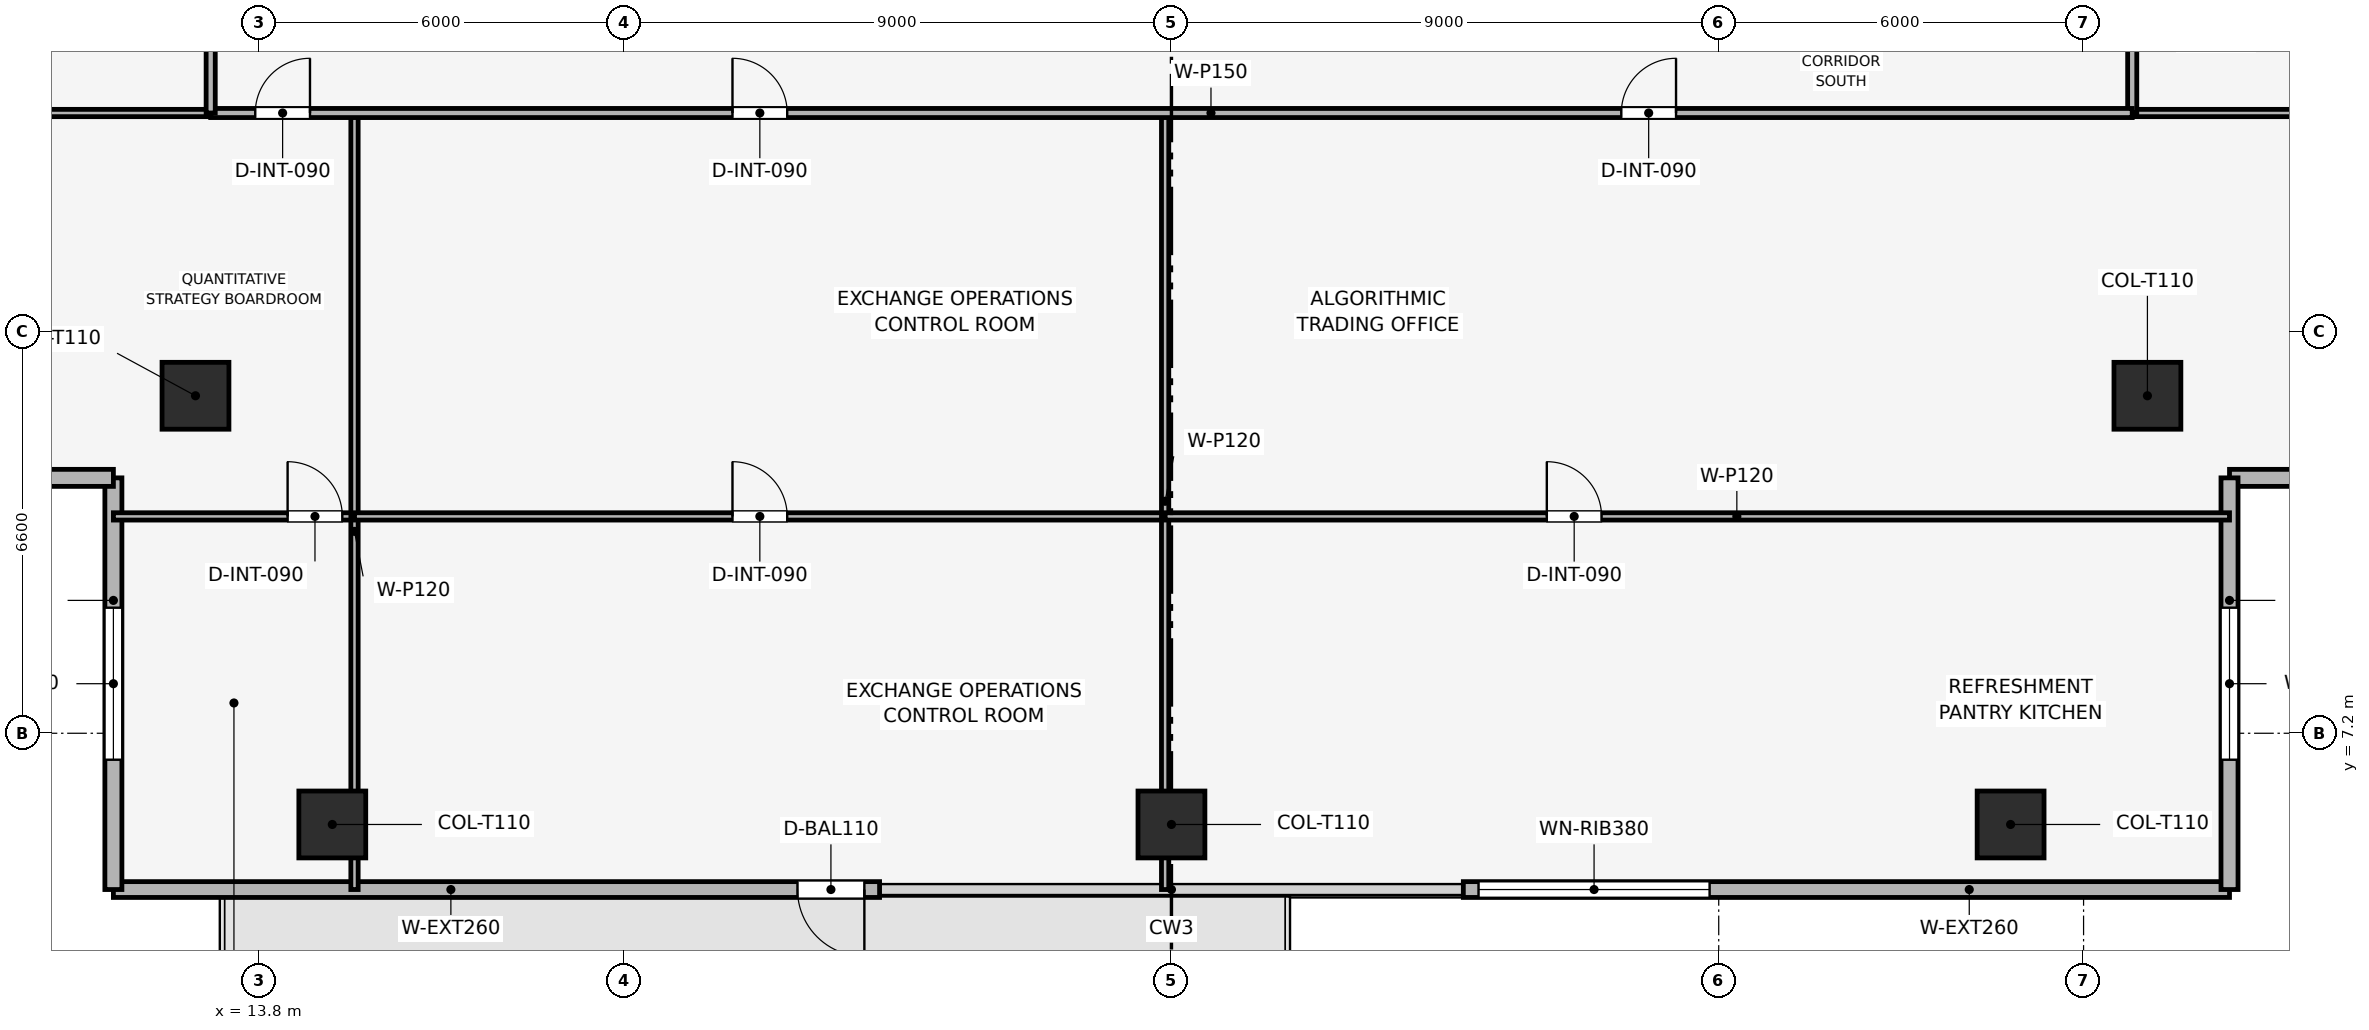
"""IFC4 building model, lengths in metres.
Left out: names, types, materials, properties, quantities, classifications, styles, units other than length and angle.
Written with IfcOpenShell. Run it as: python <this file> out.ifc"""

import sys

from ifc_helpers import new_model, si_unit, direction, frame, frame_2d, origin, origin_2d, place, context, subcontext, project, spatial, rectangle, extrude, element, fill, save


model = new_model("IFC4")
c1 = context("Model", 3, precision=1e-05, world=origin(), true_north=direction((0.0, 1.0)))
c2 = subcontext(c1, "Body", "Model", "MODEL_VIEW")
j1 = project(units=[si_unit("LENGTHUNIT", "METRE"), si_unit("PLANEANGLEUNIT", "RADIAN")], contexts=[c1])
p1 = place(None, origin())
s1 = spatial("IfcSite", under=j1, at=p1, CompositionType="ELEMENT")
p2 = place(p1, origin())
s2 = spatial("IfcBuilding", under=s1, at=p2, CompositionType="ELEMENT")
p3 = place(p2, frame((0.0, 0.0, 160.8)))
s3 = spatial("IfcBuildingStorey", under=s2, at=p3, CompositionType="ELEMENT", Elevation=160.8)
for number, where, z_axis, x_axis in (
    (1, (15.0, 5.7, 0.003), (0.0, 0.0, 1.0), (1.0, 0.0, 0.0)),
    (2, (28.8, 5.7, 0.003), (0.0, 0.0, 1.0), (1.0, 0.0, 0.0)),
    (3, (42.6, 5.7, 0.003), (0.0, 0.0, 1.0), (1.0, 0.0, 0.0)),
    (4, (12.75, 12.75, 0.003), (0.0, 0.0, 1.0), (1.0, 0.0, 0.0)),
    (5, (44.85, 12.75, 0.003), (0.0, 0.0, 1.0), (1.0, 0.0, 0.0)),
):
    element("IfcColumn", number, at=place(p3, frame(where, z_axis=z_axis, x_axis=x_axis)), inside=s3, PredefinedType="COLUMN", context=c2, shape_type="SweptSolid", body=[
        extrude(rectangle(XDim=1.1, YDim=1.1, at=origin_2d()), origin(), (0.0, 0.0, 1.0), 3.489),
    ])
p4 = place(p3, frame((46.2, 4.63, 0.0), z_axis=(0.0, 0.0, 1.0), x_axis=(-1.0, 0.0, 0.0)))
e6 = element("IfcWall", 6, at=p4, inside=s3, PredefinedType="SOLIDWALL", context=c2, shape_type="SweptSolid", body=[
    extrude(rectangle(XDim=12.6, YDim=0.26, at=frame_2d((6.3, 0.0))), origin(), (0.0, 0.0, 1.0), 3.495),
])
p5 = place(p4, frame((8.55, 0.0, 0.9)))
e7 = element("IfcOpeningElement", 7, at=p5, cuts=e6, PredefinedType="OPENING", context=c2, shape_type="SweptSolid", body=[
    extrude(rectangle(XDim=3.8, YDim=1.9, at=frame_2d((1.9, 0.95))), frame((0.0, 0.14, 0.0), z_axis=(0.0, -1.0, 0.0), x_axis=(1.0, 0.0, 0.0)), (0.0, 0.0, 1.0), 0.28),
])
p6 = place(p3, frame((24.0, 4.63, 0.0), z_axis=(0.0, 0.0, 1.0), x_axis=(-1.0, 0.0, 0.0)))
e8 = element("IfcWall", 8, at=p6, inside=s3, PredefinedType="SOLIDWALL", context=c2, shape_type="SweptSolid", body=[
    extrude(rectangle(XDim=12.6, YDim=0.26, at=frame_2d((6.3, 0.0))), origin(), (0.0, 0.0, 1.0), 3.495),
])
p7 = place(p6, frame((0.25, 0.0, 0.0)))
e9 = element("IfcOpeningElement", 9, at=p7, cuts=e8, PredefinedType="OPENING", context=c2, shape_type="SweptSolid", body=[
    extrude(rectangle(XDim=1.1, YDim=2.2, at=frame_2d((0.55, 1.1))), frame((0.0, 0.14, 0.0), z_axis=(0.0, -1.0, 0.0), x_axis=(1.0, 0.0, 0.0)), (0.0, 0.0, 1.0), 0.28),
])
p8 = place(p3, frame((11.4, 4.63, 0.0), z_axis=(0.0, 0.0, 1.0), x_axis=(0.0, 1.0, 0.0)))
e10 = element("IfcWall", 10, at=p8, inside=s3, PredefinedType="SOLIDWALL", context=c2, shape_type="SweptSolid", body=[
    extrude(rectangle(XDim=6.77, YDim=0.28, at=frame_2d((3.385, 0.0))), origin(), (0.0, 0.0, 1.0), 3.495),
])
p9 = place(p8, frame((2.135, 0.0, 0.9)))
e11 = element("IfcOpeningElement", 11, at=p9, cuts=e10, PredefinedType="OPENING", context=c2, shape_type="SweptSolid", body=[
    extrude(rectangle(XDim=2.5, YDim=1.9, at=frame_2d((1.25, 0.95))), frame((0.0, 0.15, 0.0), z_axis=(0.0, -1.0, 0.0), x_axis=(1.0, 0.0, 0.0)), (0.0, 0.0, 1.0), 0.3),
])
p10 = place(p3, frame((11.4, 11.4, 0.0), z_axis=(0.0, 0.0, 1.0), x_axis=(-1.0, 0.0, 0.0)))
e12 = element("IfcWall", 12, at=p10, inside=s3, PredefinedType="SOLIDWALL", context=c2, shape_type="SweptSolid", body=[
    extrude(rectangle(XDim=6.77, YDim=0.28, at=frame_2d((3.385, 0.0))), origin(), (0.0, 0.0, 1.0), 3.495),
])
p11 = place(p10, frame((2.135, 0.0, 0.9)))
e13 = element("IfcOpeningElement", 13, at=p11, cuts=e12, PredefinedType="OPENING", context=c2, shape_type="SweptSolid", body=[
    extrude(rectangle(XDim=2.5, YDim=1.9, at=frame_2d((1.25, 0.95))), frame((0.0, 0.15, 0.0), z_axis=(0.0, -1.0, 0.0), x_axis=(1.0, 0.0, 0.0)), (0.0, 0.0, 1.0), 0.3),
])
p12 = place(p3, frame((52.97, 11.4, 0.0), z_axis=(0.0, 0.0, 1.0), x_axis=(-1.0, 0.0, 0.0)))
e14 = element("IfcWall", 14, at=p12, inside=s3, PredefinedType="SOLIDWALL", context=c2, shape_type="SweptSolid", body=[
    extrude(rectangle(XDim=6.77, YDim=0.28, at=frame_2d((3.385, 0.0))), origin(), (0.0, 0.0, 1.0), 3.495),
])
p13 = place(p12, frame((2.135, 0.0, 0.9)))
e15 = element("IfcOpeningElement", 15, at=p13, cuts=e14, PredefinedType="OPENING", context=c2, shape_type="SweptSolid", body=[
    extrude(rectangle(XDim=2.5, YDim=1.9, at=frame_2d((1.25, 0.95))), frame((0.0, 0.15, 0.0), z_axis=(0.0, -1.0, 0.0), x_axis=(1.0, 0.0, 0.0)), (0.0, 0.0, 1.0), 0.3),
])
p14 = place(p3, frame((46.2, 11.4, 0.0), z_axis=(0.0, 0.0, 1.0), x_axis=(0.0, -1.0, 0.0)))
e16 = element("IfcWall", 16, at=p14, inside=s3, PredefinedType="SOLIDWALL", context=c2, shape_type="SweptSolid", body=[
    extrude(rectangle(XDim=6.77, YDim=0.28, at=frame_2d((3.385, 0.0))), origin(), (0.0, 0.0, 1.0), 3.495),
])
p15 = place(p14, frame((2.135, 0.0, 0.9)))
e17 = element("IfcOpeningElement", 17, at=p15, cuts=e16, PredefinedType="OPENING", context=c2, shape_type="SweptSolid", body=[
    extrude(rectangle(XDim=2.5, YDim=1.9, at=frame_2d((1.25, 0.95))), frame((0.0, 0.15, 0.0), z_axis=(0.0, -1.0, 0.0), x_axis=(1.0, 0.0, 0.0)), (0.0, 0.0, 1.0), 0.3),
])
p16 = place(p3, frame((11.4, 10.766, 0.0), z_axis=(0.0, 0.0, 1.0), x_axis=(1.0, 0.0, 0.0)))
e18 = element("IfcWall", 18, at=p16, inside=s3, PredefinedType="PARTITIONING", context=c2, shape_type="SweptSolid", body=[
    extrude(rectangle(XDim=3.965, YDim=0.12, at=frame_2d((1.982, 0.0))), origin(), (0.0, 0.0, 1.0), 2.98),
])
p17 = place(p16, frame((2.865, 0.0, 0.0)))
e19 = element("IfcOpeningElement", 19, at=p17, cuts=e18, PredefinedType="OPENING", context=c2, shape_type="SweptSolid", body=[
    extrude(rectangle(XDim=0.9, YDim=2.1, at=frame_2d((0.45, 1.05))), frame((0.0, 0.07, 0.0), z_axis=(0.0, -1.0, 0.0), x_axis=(1.0, 0.0, 0.0)), (0.0, 0.0, 1.0), 0.14),
])
p18 = place(p3, frame((15.365, 4.63, 0.0), z_axis=(0.0, 0.0, 1.0), x_axis=(0.0, 1.0, 0.0)))
e20 = element("IfcWall", 20, at=p18, inside=s3, PredefinedType="PARTITIONING", context=c2, shape_type="SweptSolid", body=[
    extrude(rectangle(XDim=12.77, YDim=0.12, at=frame_2d((6.385, 0.0))), origin(), (0.0, 0.0, 1.0), 2.98),
])
p19 = place(p3, frame((15.365, 10.766, 0.0), z_axis=(0.0, 0.0, 1.0), x_axis=(1.0, 0.0, 0.0)))
e21 = element("IfcWall", 21, at=p19, inside=s3, PredefinedType="PARTITIONING", context=c2, shape_type="SweptSolid", body=[
    extrude(rectangle(XDim=13.331, YDim=0.12, at=frame_2d((6.666, 0.0))), origin(), (0.0, 0.0, 1.0), 3.03),
])
p20 = place(p19, frame((6.216, 0.0, 0.0)))
e22 = element("IfcOpeningElement", 22, at=p20, cuts=e21, PredefinedType="OPENING", context=c2, shape_type="SweptSolid", body=[
    extrude(rectangle(XDim=0.9, YDim=2.1, at=frame_2d((0.45, 1.05))), frame((0.0, 0.07, 0.0), z_axis=(0.0, -1.0, 0.0), x_axis=(1.0, 0.0, 0.0)), (0.0, 0.0, 1.0), 0.14),
])
p21 = place(p3, frame((28.696, 4.63, 0.0), z_axis=(0.0, 0.0, 1.0), x_axis=(0.0, 1.0, 0.0)))
e23 = element("IfcWall", 23, at=p21, inside=s3, PredefinedType="PARTITIONING", context=c2, shape_type="SweptSolid", body=[
    extrude(rectangle(XDim=12.77, YDim=0.12, at=frame_2d((6.385, 0.0))), origin(), (0.0, 0.0, 1.0), 2.98),
])
p22 = place(p3, frame((28.696, 10.766, 0.0), z_axis=(0.0, 0.0, 1.0), x_axis=(1.0, 0.0, 0.0)))
e24 = element("IfcWall", 24, at=p22, inside=s3, PredefinedType="PARTITIONING", context=c2, shape_type="SweptSolid", body=[
    extrude(rectangle(XDim=17.504, YDim=0.12, at=frame_2d((8.752, 0.0))), origin(), (0.0, 0.0, 1.0), 2.98),
])
p23 = place(p22, frame((6.277, 0.0, 0.0)))
e25 = element("IfcOpeningElement", 25, at=p23, cuts=e24, PredefinedType="OPENING", context=c2, shape_type="SweptSolid", body=[
    extrude(rectangle(XDim=0.9, YDim=2.1, at=frame_2d((0.45, 1.05))), frame((0.0, 0.07, 0.0), z_axis=(0.0, -1.0, 0.0), x_axis=(1.0, 0.0, 0.0)), (0.0, 0.0, 1.0), 0.14),
])
p24 = place(p3, frame((4.63, 17.4, 0.0), z_axis=(0.0, 0.0, 1.0), x_axis=(1.0, 0.0, 0.0)))
e26 = element("IfcWall", 26, at=p24, inside=s3, PredefinedType="PARTITIONING", context=c2, shape_type="SweptSolid", body=[
    extrude(rectangle(XDim=8.37, YDim=0.12, at=frame_2d((4.185, 0.0))), origin(), (0.0, 0.0, 1.0), 2.98),
])
p25 = place(p3, frame((44.6, 17.4, 0.0), z_axis=(0.0, 0.0, 1.0), x_axis=(1.0, 0.0, 0.0)))
e27 = element("IfcWall", 27, at=p25, inside=s3, PredefinedType="PARTITIONING", context=c2, shape_type="SweptSolid", body=[
    extrude(rectangle(XDim=8.37, YDim=0.12, at=frame_2d((4.185, 0.0))), origin(), (0.0, 0.0, 1.0), 2.98),
])
p26 = place(p3, frame((44.6, 17.4, 0.0), z_axis=(0.0, 0.0, 1.0), x_axis=(0.0, 1.0, 0.0)))
e28 = element("IfcWall", 28, at=p26, inside=s3, PredefinedType="PARTITIONING", context=c2, shape_type="SweptSolid", body=[
    extrude(rectangle(XDim=2.4, YDim=0.15, at=frame_2d((1.2, 0.0))), origin(), (0.0, 0.0, 1.0), 3.495),
])
p27 = place(p3, frame((13.0, 17.4, 0.0), z_axis=(0.0, 0.0, 1.0), x_axis=(1.0, 0.0, 0.0)))
e29 = element("IfcWall", 29, at=p27, inside=s3, PredefinedType="PARTITIONING", context=c2, shape_type="SweptSolid", body=[
    extrude(rectangle(XDim=31.6, YDim=0.15, at=frame_2d((15.8, 0.0))), origin(), (0.0, 0.0, 1.0), 3.03),
])
p28 = place(p27, frame((0.733, 0.0, 0.0)))
e30 = element("IfcOpeningElement", 30, at=p28, cuts=e29, PredefinedType="OPENING", context=c2, shape_type="SweptSolid", body=[
    extrude(rectangle(XDim=0.9, YDim=2.1, at=frame_2d((0.45, 1.05))), frame((0.0, 0.085, 0.0), z_axis=(0.0, -1.0, 0.0), x_axis=(1.0, 0.0, 0.0)), (0.0, 0.0, 1.0), 0.17),
])
p29 = place(p27, frame((8.581, 0.0, 0.0)))
e31 = element("IfcOpeningElement", 31, at=p29, cuts=e29, PredefinedType="OPENING", context=c2, shape_type="SweptSolid", body=[
    extrude(rectangle(XDim=0.9, YDim=2.1, at=frame_2d((0.45, 1.05))), frame((0.0, 0.085, 0.0), z_axis=(0.0, -1.0, 0.0), x_axis=(1.0, 0.0, 0.0)), (0.0, 0.0, 1.0), 0.17),
])
p30 = place(p27, frame((23.198, 0.0, 0.0)))
e32 = element("IfcOpeningElement", 32, at=p30, cuts=e29, PredefinedType="OPENING", context=c2, shape_type="SweptSolid", body=[
    extrude(rectangle(XDim=0.9, YDim=2.1, at=frame_2d((0.45, 1.05))), frame((0.0, 0.085, 0.0), z_axis=(0.0, -1.0, 0.0), x_axis=(1.0, 0.0, 0.0)), (0.0, 0.0, 1.0), 0.17),
])
p31 = place(p3, frame((13.0, 17.4, 0.0), z_axis=(0.0, 0.0, 1.0), x_axis=(0.0, 1.0, 0.0)))
e33 = element("IfcWall", 33, at=p31, inside=s3, PredefinedType="PARTITIONING", context=c2, shape_type="SweptSolid", body=[
    extrude(rectangle(XDim=22.8, YDim=0.15, at=frame_2d((11.4, 0.0))), origin(), (0.0, 0.0, 1.0), 3.03),
])
p32 = place(p31, frame((3.113, 0.0, 0.0)))
e34 = element("IfcOpeningElement", 34, at=p32, cuts=e33, PredefinedType="OPENING", context=c2, shape_type="SweptSolid", body=[
    extrude(rectangle(XDim=0.9, YDim=2.1, at=frame_2d((0.45, 1.05))), frame((0.0, 0.085, 0.0), z_axis=(0.0, -1.0, 0.0), x_axis=(1.0, 0.0, 0.0)), (0.0, 0.0, 1.0), 0.17),
])
p33 = place(p31, frame((7.542, 0.0, 0.0)))
e35 = element("IfcOpeningElement", 35, at=p33, cuts=e33, PredefinedType="OPENING", context=c2, shape_type="SweptSolid", body=[
    extrude(rectangle(XDim=0.9, YDim=2.1, at=frame_2d((0.45, 1.05))), frame((0.0, 0.085, 0.0), z_axis=(0.0, -1.0, 0.0), x_axis=(1.0, 0.0, 0.0)), (0.0, 0.0, 1.0), 0.17),
])
p34 = place(p31, frame((15.378, 0.0, 0.0)))
e36 = element("IfcOpeningElement", 36, at=p34, cuts=e33, PredefinedType="OPENING", context=c2, shape_type="SweptSolid", body=[
    extrude(rectangle(XDim=0.9, YDim=2.1, at=frame_2d((0.45, 1.05))), frame((0.0, 0.085, 0.0), z_axis=(0.0, -1.0, 0.0), x_axis=(1.0, 0.0, 0.0)), (0.0, 0.0, 1.0), 0.17),
])
p35 = place(p7, origin())
e37 = element("IfcDoor", 37, at=p35, inside=s3, OperationType="SINGLE_SWING_LEFT", PredefinedType="DOOR", context=c2, shape_type="SweptSolid", body=[
    extrude(rectangle(XDim=1.1, YDim=2.2, at=frame_2d((0.55, 1.1))), frame((0.0, 0.025, 0.0), z_axis=(0.0, -1.0, 0.0), x_axis=(1.0, 0.0, 0.0)), (0.0, 0.0, 1.0), 0.05),
])
fill(e9, e37)
p36 = place(p5, origin())
e38 = element("IfcWindow", 38, at=p36, inside=s3, PartitioningType="SINGLE_PANEL", PredefinedType="WINDOW", context=c2, shape_type="SweptSolid", body=[
    extrude(rectangle(XDim=3.8, YDim=1.9, at=frame_2d((1.9, 0.95))), frame((0.0, 0.03, 0.0), z_axis=(0.0, -1.0, 0.0), x_axis=(1.0, 0.0, 0.0)), (0.0, 0.0, 1.0), 0.06),
])
fill(e7, e38)
p37 = place(p9, origin())
e39 = element("IfcWindow", 39, at=p37, inside=s3, PartitioningType="SINGLE_PANEL", PredefinedType="WINDOW", context=c2, shape_type="SweptSolid", body=[
    extrude(rectangle(XDim=2.5, YDim=1.9, at=frame_2d((1.25, 0.95))), frame((0.0, 0.03, 0.0), z_axis=(0.0, -1.0, 0.0), x_axis=(1.0, 0.0, 0.0)), (0.0, 0.0, 1.0), 0.06),
])
fill(e11, e39)
p38 = place(p15, origin())
e40 = element("IfcWindow", 40, at=p38, inside=s3, PartitioningType="SINGLE_PANEL", PredefinedType="WINDOW", context=c2, shape_type="SweptSolid", body=[
    extrude(rectangle(XDim=2.5, YDim=1.9, at=frame_2d((1.25, 0.95))), frame((0.0, 0.03, 0.0), z_axis=(0.0, -1.0, 0.0), x_axis=(1.0, 0.0, 0.0)), (0.0, 0.0, 1.0), 0.06),
])
fill(e17, e40)
p39 = place(p17, origin())
e41 = element("IfcDoor", 41, at=p39, inside=s3, OperationType="SINGLE_SWING_LEFT", PredefinedType="DOOR", context=c2, shape_type="SweptSolid", body=[
    extrude(rectangle(XDim=0.9, YDim=2.1, at=frame_2d((0.45, 1.05))), frame((0.0, 0.025, 0.0), z_axis=(0.0, -1.0, 0.0), x_axis=(1.0, 0.0, 0.0)), (0.0, 0.0, 1.0), 0.05),
])
fill(e19, e41)
p40 = place(p20, origin())
e42 = element("IfcDoor", 42, at=p40, inside=s3, OperationType="SINGLE_SWING_LEFT", PredefinedType="DOOR", context=c2, shape_type="SweptSolid", body=[
    extrude(rectangle(XDim=0.9, YDim=2.1, at=frame_2d((0.45, 1.05))), frame((0.0, 0.025, 0.0), z_axis=(0.0, -1.0, 0.0), x_axis=(1.0, 0.0, 0.0)), (0.0, 0.0, 1.0), 0.05),
])
fill(e22, e42)
p41 = place(p23, origin())
e43 = element("IfcDoor", 43, at=p41, inside=s3, OperationType="SINGLE_SWING_LEFT", PredefinedType="DOOR", context=c2, shape_type="SweptSolid", body=[
    extrude(rectangle(XDim=0.9, YDim=2.1, at=frame_2d((0.45, 1.05))), frame((0.0, 0.025, 0.0), z_axis=(0.0, -1.0, 0.0), x_axis=(1.0, 0.0, 0.0)), (0.0, 0.0, 1.0), 0.05),
])
fill(e25, e43)
p42 = place(p28, origin())
e44 = element("IfcDoor", 44, at=p42, inside=s3, OperationType="SINGLE_SWING_RIGHT", PredefinedType="DOOR", context=c2, shape_type="SweptSolid", body=[
    extrude(rectangle(XDim=0.9, YDim=2.1, at=frame_2d((0.45, 1.05))), frame((0.0, 0.025, 0.0), z_axis=(0.0, -1.0, 0.0), x_axis=(1.0, 0.0, 0.0)), (0.0, 0.0, 1.0), 0.05),
])
fill(e30, e44)
p43 = place(p29, origin())
e45 = element("IfcDoor", 45, at=p43, inside=s3, OperationType="SINGLE_SWING_LEFT", PredefinedType="DOOR", context=c2, shape_type="SweptSolid", body=[
    extrude(rectangle(XDim=0.9, YDim=2.1, at=frame_2d((0.45, 1.05))), frame((0.0, 0.025, 0.0), z_axis=(0.0, -1.0, 0.0), x_axis=(1.0, 0.0, 0.0)), (0.0, 0.0, 1.0), 0.05),
])
fill(e31, e45)
p44 = place(p30, origin())
e46 = element("IfcDoor", 46, at=p44, inside=s3, OperationType="SINGLE_SWING_RIGHT", PredefinedType="DOOR", context=c2, shape_type="SweptSolid", body=[
    extrude(rectangle(XDim=0.9, YDim=2.1, at=frame_2d((0.45, 1.05))), frame((0.0, 0.025, 0.0), z_axis=(0.0, -1.0, 0.0), x_axis=(1.0, 0.0, 0.0)), (0.0, 0.0, 1.0), 0.05),
])
fill(e32, e46)
save(model, sys.argv[1])
